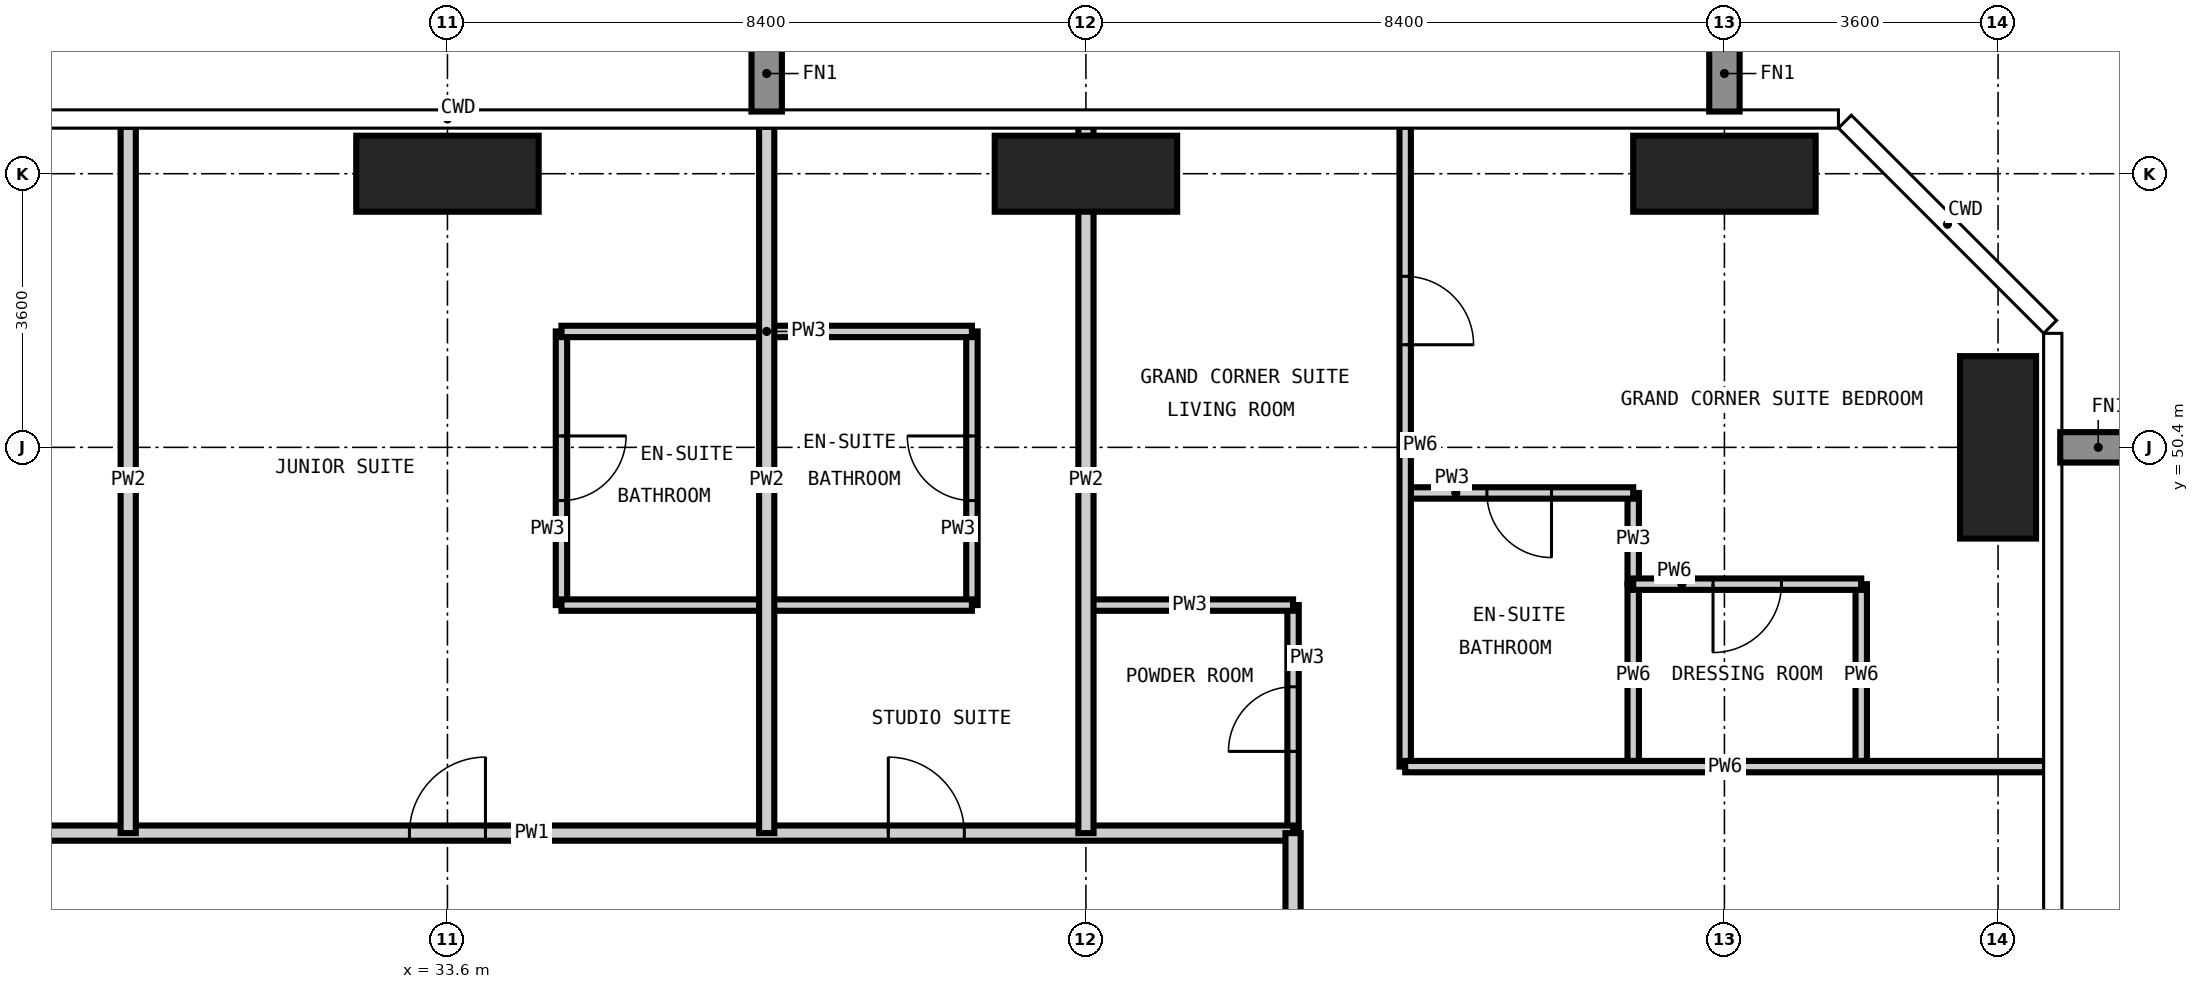
"""IFC4 building model, lengths in metres.
Left out: names, types, materials, properties, quantities, classifications, styles, units other than length and angle.
Written with IfcOpenShell. Run it as: python <this file> out.ifc"""

import sys

from ifc_helpers import new_model, si_unit, direction, frame, frame_2d, origin, origin_2d, place, context, subcontext, project, spatial, rectangle, extrude, element, fill, save


model = new_model("IFC4")
c1 = context("Model", 3, precision=1e-05, world=origin(), true_north=direction((0.0, 1.0)))
c2 = subcontext(c1, "Body", "Model", "MODEL_VIEW")
j1 = project(units=[si_unit("LENGTHUNIT", "METRE"), si_unit("PLANEANGLEUNIT", "RADIAN")], contexts=[c1])
p1 = place(None, origin())
s1 = spatial("IfcSite", under=j1, at=p1, CompositionType="ELEMENT")
p2 = place(p1, origin())
s2 = spatial("IfcBuilding", under=s1, at=p2, CompositionType="ELEMENT")
p3 = place(p2, frame((0.0, 0.0, 252.9)))
s3 = spatial("IfcBuildingStorey", under=s2, at=p3, CompositionType="ELEMENT", Elevation=252.9)
for number, where, z_axis, x_axis in (
    (1, (33.6, 54.0, -0.35), (0.0, 0.0, 1.0), (1.0, 0.0, 0.0)),
    (2, (42.0, 54.0, -0.35), (0.0, 0.0, 1.0), (1.0, 0.0, 0.0)),
    (3, (50.4, 54.0, -0.35), (0.0, 0.0, 1.0), (1.0, 0.0, 0.0)),
):
    element("IfcColumn", number, at=place(p3, frame(where, z_axis=z_axis, x_axis=x_axis)), inside=s3, PredefinedType="COLUMN", context=c2, shape_type="SweptSolid", body=[
        extrude(rectangle(XDim=2.4, YDim=1.0, at=origin_2d()), origin(), (0.0, 0.0, 1.0), 3.9),
    ])
p4 = place(p3, frame((54.0, 50.4, -0.35), z_axis=(0.0, 0.0, 1.0), x_axis=(1.0, 0.0, 0.0)))
e4 = element("IfcColumn", 4, at=p4, inside=s3, PredefinedType="COLUMN", context=c2, shape_type="SweptSolid", body=[
    extrude(rectangle(XDim=1.0, YDim=2.4, at=origin_2d()), origin(), (0.0, 0.0, 1.0), 3.9),
])
p5 = place(p3, frame((35.1, 48.325, 0.0), z_axis=(0.0, 0.0, 1.0), x_axis=(0.0, 1.0, 0.0)))
e5 = element("IfcWall", 5, at=p5, inside=s3, PredefinedType="PARTITIONING", context=c2, shape_type="SweptSolid", body=[
    extrude(rectangle(XDim=3.6, YDim=0.15, at=frame_2d((1.8, 0.0))), origin(), (0.0, 0.0, 1.0), 3.55),
])
p6 = place(p5, frame((1.375, 0.0, 0.0)))
e6 = element("IfcOpeningElement", 6, at=p6, cuts=e5, PredefinedType="OPENING", context=c2, shape_type="SweptSolid", body=[
    extrude(rectangle(XDim=0.85, YDim=2.1, at=frame_2d((0.425, 1.05))), frame((0.0, 0.085, 0.0), z_axis=(0.0, -1.0, 0.0), x_axis=(1.0, 0.0, 0.0)), (0.0, 0.0, 1.0), 0.17),
])
p7 = place(p3, frame((40.5, 48.325, 0.0), z_axis=(0.0, 0.0, 1.0), x_axis=(0.0, 1.0, 0.0)))
e7 = element("IfcWall", 7, at=p7, inside=s3, PredefinedType="PARTITIONING", context=c2, shape_type="SweptSolid", body=[
    extrude(rectangle(XDim=3.6, YDim=0.15, at=frame_2d((1.8, 0.0))), origin(), (0.0, 0.0, 1.0), 3.55),
])
p8 = place(p7, frame((1.375, 0.0, 0.0)))
e8 = element("IfcOpeningElement", 8, at=p8, cuts=e7, PredefinedType="OPENING", context=c2, shape_type="SweptSolid", body=[
    extrude(rectangle(XDim=0.85, YDim=2.1, at=frame_2d((0.425, 1.05))), frame((0.0, 0.085, 0.0), z_axis=(0.0, -1.0, 0.0), x_axis=(1.0, 0.0, 0.0)), (0.0, 0.0, 1.0), 0.17),
])
p9 = place(p3, frame((44.725, 45.325, 0.0), z_axis=(0.0, 0.0, 1.0), x_axis=(0.0, 1.0, 0.0)))
e9 = element("IfcWall", 9, at=p9, inside=s3, PredefinedType="PARTITIONING", context=c2, shape_type="SweptSolid", body=[
    extrude(rectangle(XDim=3.0, YDim=0.15, at=frame_2d((1.5, 0.0))), origin(), (0.0, 0.0, 1.0), 3.55),
])
p10 = place(p9, frame((1.075, 0.0, 0.0)))
e10 = element("IfcOpeningElement", 10, at=p10, cuts=e9, PredefinedType="OPENING", context=c2, shape_type="SweptSolid", body=[
    extrude(rectangle(XDim=0.85, YDim=2.1, at=frame_2d((0.425, 1.05))), frame((0.0, 0.085, 0.0), z_axis=(0.0, -1.0, 0.0), x_axis=(1.0, 0.0, 0.0)), (0.0, 0.0, 1.0), 0.17),
])
p11 = place(p3, frame((49.2, 48.6, 0.0), z_axis=(0.0, 0.0, 1.0), x_axis=(0.0, 1.0, 0.0)))
e11 = element("IfcWall", 11, at=p11, inside=s3, PredefinedType="PARTITIONING", context=c2, shape_type="SweptSolid", body=[
    extrude(rectangle(XDim=1.2, YDim=0.15, at=frame_2d((0.6, 0.0))), origin(), (0.0, 0.0, 1.0), 3.55),
])
p12 = place(p3, frame((35.1, 48.325, 0.0), z_axis=(0.0, 0.0, 1.0), x_axis=(1.0, 0.0, 0.0)))
e12 = element("IfcWall", 12, at=p12, inside=s3, PredefinedType="PARTITIONING", context=c2, shape_type="SweptSolid", body=[
    extrude(rectangle(XDim=5.4, YDim=0.15, at=frame_2d((2.7, 0.0))), origin(), (0.0, 0.0, 1.0), 3.55),
])
p13 = place(p3, frame((42.0, 48.325, 0.0), z_axis=(0.0, 0.0, 1.0), x_axis=(1.0, 0.0, 0.0)))
e13 = element("IfcWall", 13, at=p13, inside=s3, PredefinedType="PARTITIONING", context=c2, shape_type="SweptSolid", body=[
    extrude(rectangle(XDim=2.725, YDim=0.15, at=frame_2d((1.363, 0.0))), origin(), (0.0, 0.0, 1.0), 3.55),
])
p14 = place(p3, frame((46.2, 49.8, 0.0), z_axis=(0.0, 0.0, 1.0), x_axis=(1.0, 0.0, 0.0)))
e14 = element("IfcWall", 14, at=p14, inside=s3, PredefinedType="PARTITIONING", context=c2, shape_type="SweptSolid", body=[
    extrude(rectangle(XDim=3.0, YDim=0.15, at=frame_2d((1.5, 0.0))), origin(), (0.0, 0.0, 1.0), 3.55),
])
p15 = place(p14, frame((1.075, 0.0, 0.0)))
e15 = element("IfcOpeningElement", 15, at=p15, cuts=e14, PredefinedType="OPENING", context=c2, shape_type="SweptSolid", body=[
    extrude(rectangle(XDim=0.85, YDim=2.1, at=frame_2d((0.425, 1.05))), frame((0.0, 0.085, 0.0), z_axis=(0.0, -1.0, 0.0), x_axis=(1.0, 0.0, 0.0)), (0.0, 0.0, 1.0), 0.17),
])
p16 = place(p3, frame((35.1, 51.925, 0.0), z_axis=(0.0, 0.0, 1.0), x_axis=(1.0, 0.0, 0.0)))
e16 = element("IfcWall", 16, at=p16, inside=s3, PredefinedType="PARTITIONING", context=c2, shape_type="SweptSolid", body=[
    extrude(rectangle(XDim=5.4, YDim=0.15, at=frame_2d((2.7, 0.0))), origin(), (0.0, 0.0, 1.0), 3.55),
])
p17 = place(p3, frame((23.075, 45.325, 0.0), z_axis=(0.0, 0.0, 1.0), x_axis=(1.0, 0.0, 0.0)))
e17 = element("IfcWall", 17, at=p17, inside=s3, PredefinedType="PARTITIONING", context=c2, shape_type="SweptSolid", body=[
    extrude(rectangle(XDim=21.65, YDim=0.2, at=frame_2d((10.825, 0.0))), origin(), (0.0, 0.0, 1.0), 3.55),
])
p18 = place(p17, frame((3.725, 0.0, 0.0)))
e18 = element("IfcOpeningElement", 18, at=p18, cuts=e17, PredefinedType="OPENING", context=c2, shape_type="SweptSolid", body=[
    extrude(rectangle(XDim=1.0, YDim=2.2, at=frame_2d((0.5, 1.1))), frame((0.0, 0.11, 0.0), z_axis=(0.0, -1.0, 0.0), x_axis=(1.0, 0.0, 0.0)), (0.0, 0.0, 1.0), 0.22),
])
p19 = place(p17, frame((10.025, 0.0, 0.0)))
e19 = element("IfcOpeningElement", 19, at=p19, cuts=e17, PredefinedType="OPENING", context=c2, shape_type="SweptSolid", body=[
    extrude(rectangle(XDim=1.0, YDim=2.2, at=frame_2d((0.5, 1.1))), frame((0.0, 0.11, 0.0), z_axis=(0.0, -1.0, 0.0), x_axis=(1.0, 0.0, 0.0)), (0.0, 0.0, 1.0), 0.22),
])
p20 = place(p17, frame((16.325, 0.0, 0.0)))
e20 = element("IfcOpeningElement", 20, at=p20, cuts=e17, PredefinedType="OPENING", context=c2, shape_type="SweptSolid", body=[
    extrude(rectangle(XDim=1.0, YDim=2.2, at=frame_2d((0.5, 1.1))), frame((0.0, 0.11, 0.0), z_axis=(0.0, -1.0, 0.0), x_axis=(1.0, 0.0, 0.0)), (0.0, 0.0, 1.0), 0.22),
])
p21 = place(p3, frame((44.725, 45.325, 0.0), z_axis=(0.0, 0.0, 1.0), x_axis=(0.0, -1.0, 0.0)))
e21 = element("IfcWall", 21, at=p21, inside=s3, PredefinedType="PARTITIONING", context=c2, shape_type="SweptSolid", body=[
    extrude(rectangle(XDim=11.725, YDim=0.2, at=frame_2d((5.862, 0.0))), origin(), (0.0, 0.0, 1.0), 3.55),
])
p22 = place(p21, frame((9.125, 0.0, 0.0)))
e22 = element("IfcOpeningElement", 22, at=p22, cuts=e21, PredefinedType="OPENING", context=c2, shape_type="SweptSolid", body=[
    extrude(rectangle(XDim=1.0, YDim=2.2, at=frame_2d((0.5, 1.1))), frame((0.0, 0.11, 0.0), z_axis=(0.0, -1.0, 0.0), x_axis=(1.0, 0.0, 0.0)), (0.0, 0.0, 1.0), 0.22),
])
p23 = place(p21, frame((4.925, 0.0, 0.0)))
e23 = element("IfcOpeningElement", 23, at=p23, cuts=e21, PredefinedType="OPENING", context=c2, shape_type="SweptSolid", body=[
    extrude(rectangle(XDim=1.0, YDim=2.2, at=frame_2d((0.5, 1.1))), frame((0.0, 0.11, 0.0), z_axis=(0.0, -1.0, 0.0), x_axis=(1.0, 0.0, 0.0)), (0.0, 0.0, 1.0), 0.22),
])
p24 = place(p21, frame((1.162, 0.0, 0.0)))
e24 = element("IfcOpeningElement", 24, at=p24, cuts=e21, PredefinedType="OPENING", context=c2, shape_type="SweptSolid", body=[
    extrude(rectangle(XDim=1.0, YDim=2.2, at=frame_2d((0.5, 1.1))), frame((0.0, 0.11, 0.0), z_axis=(0.0, -1.0, 0.0), x_axis=(1.0, 0.0, 0.0)), (0.0, 0.0, 1.0), 0.22),
])
for number, where, z_axis, x_axis in (
    (25, (29.4, 45.325, 0.0), (0.0, 0.0, 1.0), (0.0, 1.0, 0.0)),
    (26, (37.8, 45.325, 0.0), (0.0, 0.0, 1.0), (0.0, 1.0, 0.0)),
    (27, (42.0, 45.325, 0.0), (0.0, 0.0, 1.0), (0.0, 1.0, 0.0)),
):
    element("IfcWall", number, at=place(p3, frame(where, z_axis=z_axis, x_axis=x_axis)), inside=s3, PredefinedType="PARTITIONING", context=c2, shape_type="SweptSolid", body=[
        extrude(rectangle(XDim=9.293, YDim=0.2, at=frame_2d((4.646, 0.0))), origin(), (0.0, 0.0, 1.0), 3.55),
    ])
p25 = place(p3, frame((46.2, 46.2, 0.0), z_axis=(0.0, 0.0, 1.0), x_axis=(0.0, 1.0, 0.0)))
e28 = element("IfcWall", 28, at=p25, inside=s3, PredefinedType="PARTITIONING", context=c2, shape_type="SweptSolid", body=[
    extrude(rectangle(XDim=8.418, YDim=0.15, at=frame_2d((4.209, 0.0))), origin(), (0.0, 0.0, 1.0), 3.55),
])
p26 = place(p25, frame((5.55, 0.0, 0.0)))
e29 = element("IfcOpeningElement", 29, at=p26, cuts=e28, PredefinedType="OPENING", context=c2, shape_type="SweptSolid", body=[
    extrude(rectangle(XDim=0.9, YDim=2.1, at=frame_2d((0.45, 1.05))), frame((0.0, 0.085, 0.0), z_axis=(0.0, -1.0, 0.0), x_axis=(1.0, 0.0, 0.0)), (0.0, 0.0, 1.0), 0.17),
])
for number, where, z_axis, x_axis in (
    (30, (49.2, 46.2, 0.0), (0.0, 0.0, 1.0), (0.0, 1.0, 0.0)),
    (31, (52.2, 46.2, 0.0), (0.0, 0.0, 1.0), (0.0, 1.0, 0.0)),
):
    element("IfcWall", number, at=place(p3, frame(where, z_axis=z_axis, x_axis=x_axis)), inside=s3, PredefinedType="PARTITIONING", context=c2, shape_type="SweptSolid", body=[
        extrude(rectangle(XDim=2.4, YDim=0.15, at=frame_2d((1.2, 0.0))), origin(), (0.0, 0.0, 1.0), 3.55),
    ])
p27 = place(p3, frame((46.2, 46.2, 0.0), z_axis=(0.0, 0.0, 1.0), x_axis=(1.0, 0.0, 0.0)))
e32 = element("IfcWall", 32, at=p27, inside=s3, PredefinedType="PARTITIONING", context=c2, shape_type="SweptSolid", body=[
    extrude(rectangle(XDim=8.418, YDim=0.15, at=frame_2d((4.209, 0.0))), origin(), (0.0, 0.0, 1.0), 3.55),
])
p28 = place(p3, frame((49.2, 48.6, 0.0), z_axis=(0.0, 0.0, 1.0), x_axis=(1.0, 0.0, 0.0)))
e33 = element("IfcWall", 33, at=p28, inside=s3, PredefinedType="PARTITIONING", context=c2, shape_type="SweptSolid", body=[
    extrude(rectangle(XDim=3.0, YDim=0.15, at=frame_2d((1.5, 0.0))), origin(), (0.0, 0.0, 1.0), 3.55),
])
p29 = place(p28, frame((1.05, 0.0, 0.0)))
e34 = element("IfcOpeningElement", 34, at=p29, cuts=e33, PredefinedType="OPENING", context=c2, shape_type="SweptSolid", body=[
    extrude(rectangle(XDim=0.9, YDim=2.1, at=frame_2d((0.45, 1.05))), frame((0.0, 0.085, 0.0), z_axis=(0.0, -1.0, 0.0), x_axis=(1.0, 0.0, 0.0)), (0.0, 0.0, 1.0), 0.17),
])
p30 = place(p19, origin())
e35 = element("IfcDoor", 35, at=p30, inside=s3, OperationType="SINGLE_SWING_RIGHT", PredefinedType="DOOR", context=c2, shape_type="SweptSolid", body=[
    extrude(rectangle(XDim=1.0, YDim=2.2, at=frame_2d((0.5, 1.1))), frame((0.0, 0.025, 0.0), z_axis=(0.0, -1.0, 0.0), x_axis=(1.0, 0.0, 0.0)), (0.0, 0.0, 1.0), 0.05),
])
fill(e19, e35)
p31 = place(p6, frame((0.85, 0.0, 0.0), z_axis=(0.0, 0.0, 1.0), x_axis=(-1.0, 0.0, 0.0)))
e36 = element("IfcDoor", 36, at=p31, inside=s3, OperationType="SINGLE_SWING_LEFT", PredefinedType="DOOR", context=c2, shape_type="SweptSolid", body=[
    extrude(rectangle(XDim=0.85, YDim=2.1, at=frame_2d((0.425, 1.05))), frame((0.0, 0.025, 0.0), z_axis=(0.0, -1.0, 0.0), x_axis=(1.0, 0.0, 0.0)), (0.0, 0.0, 1.0), 0.05),
])
fill(e6, e36)
p32 = place(p20, origin())
e37 = element("IfcDoor", 37, at=p32, inside=s3, OperationType="SINGLE_SWING_LEFT", PredefinedType="DOOR", context=c2, shape_type="SweptSolid", body=[
    extrude(rectangle(XDim=1.0, YDim=2.2, at=frame_2d((0.5, 1.1))), frame((0.0, 0.025, 0.0), z_axis=(0.0, -1.0, 0.0), x_axis=(1.0, 0.0, 0.0)), (0.0, 0.0, 1.0), 0.05),
])
fill(e20, e37)
p33 = place(p8, origin())
e38 = element("IfcDoor", 38, at=p33, inside=s3, OperationType="SINGLE_SWING_RIGHT", PredefinedType="DOOR", context=c2, shape_type="SweptSolid", body=[
    extrude(rectangle(XDim=0.85, YDim=2.1, at=frame_2d((0.425, 1.05))), frame((0.0, 0.025, 0.0), z_axis=(0.0, -1.0, 0.0), x_axis=(1.0, 0.0, 0.0)), (0.0, 0.0, 1.0), 0.05),
])
fill(e8, e38)
p34 = place(p10, origin())
e39 = element("IfcDoor", 39, at=p34, inside=s3, OperationType="SINGLE_SWING_LEFT", PredefinedType="DOOR", context=c2, shape_type="SweptSolid", body=[
    extrude(rectangle(XDim=0.85, YDim=2.1, at=frame_2d((0.425, 1.05))), frame((0.0, 0.025, 0.0), z_axis=(0.0, -1.0, 0.0), x_axis=(1.0, 0.0, 0.0)), (0.0, 0.0, 1.0), 0.05),
])
fill(e10, e39)
p35 = place(p26, frame((0.9, 0.0, 0.0), z_axis=(0.0, 0.0, 1.0), x_axis=(-1.0, 0.0, 0.0)))
e40 = element("IfcDoor", 40, at=p35, inside=s3, OperationType="SINGLE_SWING_RIGHT", PredefinedType="DOOR", context=c2, shape_type="SweptSolid", body=[
    extrude(rectangle(XDim=0.9, YDim=2.1, at=frame_2d((0.45, 1.05))), frame((0.0, 0.025, 0.0), z_axis=(0.0, -1.0, 0.0), x_axis=(1.0, 0.0, 0.0)), (0.0, 0.0, 1.0), 0.05),
])
fill(e29, e40)
p36 = place(p15, frame((0.85, 0.0, 0.0), z_axis=(0.0, 0.0, 1.0), x_axis=(-1.0, 0.0, 0.0)))
e41 = element("IfcDoor", 41, at=p36, inside=s3, OperationType="SINGLE_SWING_LEFT", PredefinedType="DOOR", context=c2, shape_type="SweptSolid", body=[
    extrude(rectangle(XDim=0.85, YDim=2.1, at=frame_2d((0.425, 1.05))), frame((0.0, 0.025, 0.0), z_axis=(0.0, -1.0, 0.0), x_axis=(1.0, 0.0, 0.0)), (0.0, 0.0, 1.0), 0.05),
])
fill(e15, e41)
p37 = place(p29, frame((0.9, 0.0, 0.0), z_axis=(0.0, 0.0, 1.0), x_axis=(-1.0, 0.0, 0.0)))
e42 = element("IfcDoor", 42, at=p37, inside=s3, OperationType="SINGLE_SWING_RIGHT", PredefinedType="DOOR", context=c2, shape_type="SweptSolid", body=[
    extrude(rectangle(XDim=0.9, YDim=2.1, at=frame_2d((0.45, 1.05))), frame((0.0, 0.025, 0.0), z_axis=(0.0, -1.0, 0.0), x_axis=(1.0, 0.0, 0.0)), (0.0, 0.0, 1.0), 0.05),
])
fill(e34, e42)
save(model, sys.argv[1])
